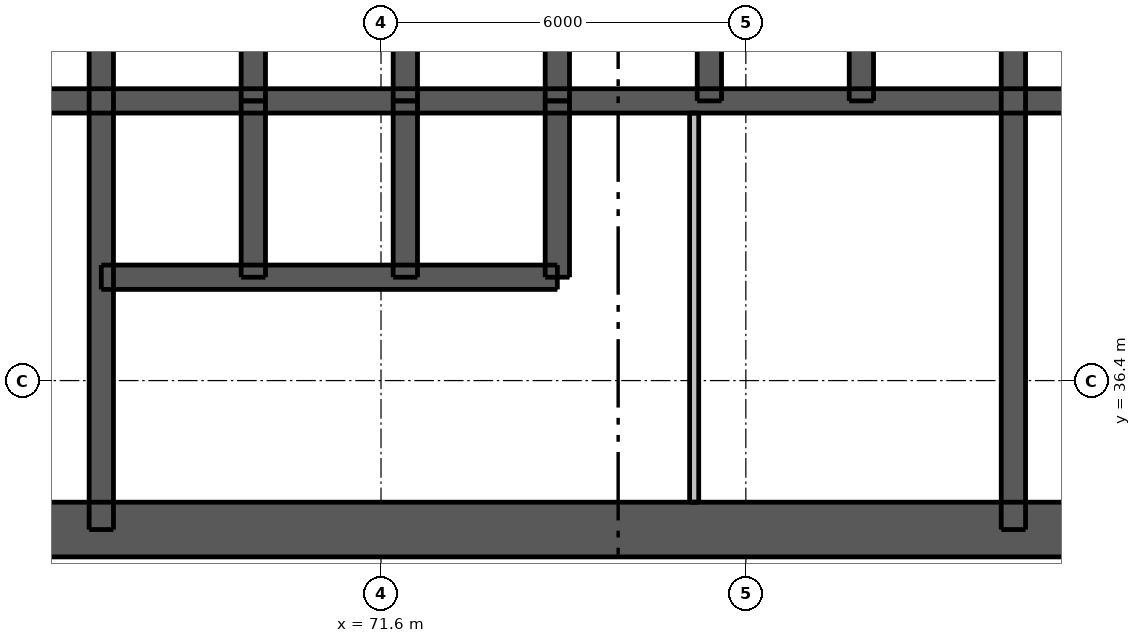
"""IFC4 building model, lengths in metres.
Left out: names, types, materials, properties, quantities, classifications, styles, units other than length and angle.
Written with IfcOpenShell. Run it as: python <this file> out.ifc"""

import sys

from ifc_helpers import new_model, si_unit, direction, frame, frame_2d, origin, place, context, subcontext, project, spatial, rectangle, extrude, element, fill, save


model = new_model("IFC4")
c1 = context("Model", 3, precision=1e-05, world=origin(), true_north=direction((0.0, 1.0)))
c2 = subcontext(c1, "Body", "Model", "MODEL_VIEW")
j1 = project(units=[si_unit("LENGTHUNIT", "METRE"), si_unit("PLANEANGLEUNIT", "RADIAN")], contexts=[c1])
p1 = place(None, origin())
s1 = spatial("IfcSite", under=j1, at=p1, CompositionType="ELEMENT")
p2 = place(p1, origin())
s2 = spatial("IfcBuilding", under=s1, at=p2, CompositionType="ELEMENT")
p3 = place(p2, frame((0.0, 0.0, 33.4)))
s3 = spatial("IfcBuildingStorey", under=s2, at=p3, CompositionType="ELEMENT", Elevation=33.4)
p4 = place(p3, frame((62.5, 33.95, 0.0), z_axis=(0.0, 0.0, 1.0), x_axis=(1.0, 0.0, 0.0)))
e1 = element("IfcWall", 1, at=p4, inside=s3, PredefinedType="SHEAR", context=c2, shape_type="SweptSolid", body=[
    extrude(rectangle(XDim=24.0, YDim=0.9, at=frame_2d((12.0, 0.0))), origin(), (0.0, 0.0, 1.0), 3.05),
])
p5 = place(p4, frame((2.05, 0.0, 0.0)))
e2 = element("IfcOpeningElement", 2, at=p5, cuts=e1, PredefinedType="OPENING", context=c2, shape_type="SweptSolid", body=[
    extrude(rectangle(XDim=1.1, YDim=2.1, at=frame_2d((0.55, 1.05))), frame((0.0, 0.46, 0.0), z_axis=(0.0, -1.0, 0.0), x_axis=(1.0, 0.0, 0.0)), (0.0, 0.0, 1.0), 0.92),
])
p6 = place(p4, frame((20.85, 0.0, 0.0)))
e3 = element("IfcOpeningElement", 3, at=p6, cuts=e1, PredefinedType="OPENING", context=c2, shape_type="SweptSolid", body=[
    extrude(rectangle(XDim=1.1, YDim=2.1, at=frame_2d((0.55, 1.05))), frame((0.0, 0.46, 0.0), z_axis=(0.0, -1.0, 0.0), x_axis=(1.0, 0.0, 0.0)), (0.0, 0.0, 1.0), 0.92),
])
p7 = place(p4, frame((8.0, 0.0, 0.0)))
e4 = element("IfcOpeningElement", 4, at=p7, cuts=e1, PredefinedType="OPENING", context=c2, shape_type="SweptSolid", body=[
    extrude(rectangle(XDim=1.1, YDim=2.1, at=frame_2d((0.55, 1.05))), frame((0.0, 0.46, 0.0), z_axis=(0.0, -1.0, 0.0), x_axis=(1.0, 0.0, 0.0)), (0.0, 0.0, 1.0), 0.92),
])
p8 = place(p4, frame((16.363, 0.0, 0.0)))
e5 = element("IfcOpeningElement", 5, at=p8, cuts=e1, PredefinedType="OPENING", context=c2, shape_type="SweptSolid", body=[
    extrude(rectangle(XDim=0.9, YDim=2.1, at=frame_2d((0.45, 1.05))), frame((0.0, 0.46, 0.0), z_axis=(0.0, -1.0, 0.0), x_axis=(1.0, 0.0, 0.0)), (0.0, 0.0, 1.0), 0.92),
])
p9 = place(p3, frame((62.95, 41.0, 0.0), z_axis=(0.0, 0.0, 1.0), x_axis=(1.0, 0.0, 0.0)))
e6 = element("IfcWall", 6, at=p9, inside=s3, PredefinedType="SHEAR", context=c2, shape_type="SweptSolid", body=[
    extrude(rectangle(XDim=23.1, YDim=0.4, at=frame_2d((11.55, 0.0))), origin(), (0.0, 0.0, 1.0), 3.05),
])
p10 = place(p3, frame((67.0, 33.95, 0.0), z_axis=(0.0, 0.0, 1.0), x_axis=(0.0, 1.0, 0.0)))
e7 = element("IfcWall", 7, at=p10, inside=s3, PredefinedType="SHEAR", context=c2, shape_type="SweptSolid", body=[
    extrude(rectangle(XDim=9.95, YDim=0.4, at=frame_2d((4.975, 0.0))), origin(), (0.0, 0.0, 1.0), 3.05),
])
p11 = place(p10, frame((0.65, 0.0, 0.0)))
e8 = element("IfcOpeningElement", 8, at=p11, cuts=e7, PredefinedType="OPENING", context=c2, shape_type="SweptSolid", body=[
    extrude(rectangle(XDim=1.1, YDim=2.1, at=frame_2d((0.55, 1.05))), frame((0.0, 0.21, 0.0), z_axis=(0.0, -1.0, 0.0), x_axis=(1.0, 0.0, 0.0)), (0.0, 0.0, 1.0), 0.42),
])
p12 = place(p3, frame((82.0, 33.95, 0.0), z_axis=(0.0, 0.0, 1.0), x_axis=(0.0, 1.0, 0.0)))
e9 = element("IfcWall", 9, at=p12, inside=s3, PredefinedType="SHEAR", context=c2, shape_type="SweptSolid", body=[
    extrude(rectangle(XDim=9.95, YDim=0.4, at=frame_2d((4.975, 0.0))), origin(), (0.0, 0.0, 1.0), 3.05),
])
for number, where, z_axis, x_axis in (
    (10, (69.5, 41.0, 0.0), (0.0, 0.0, 1.0), (0.0, 1.0, 0.0)),
    (11, (72.0, 41.0, 0.0), (0.0, 0.0, 1.0), (0.0, 1.0, 0.0)),
    (12, (74.5, 41.0, 0.0), (0.0, 0.0, 1.0), (0.0, 1.0, 0.0)),
    (13, (77.0, 41.0, 0.0), (0.0, 0.0, 1.0), (0.0, 1.0, 0.0)),
    (14, (79.5, 41.0, 0.0), (0.0, 0.0, 1.0), (0.0, 1.0, 0.0)),
):
    element("IfcWall", number, at=place(p3, frame(where, z_axis=z_axis, x_axis=x_axis)), inside=s3, PredefinedType="SHEAR", context=c2, shape_type="SweptSolid", body=[
        extrude(rectangle(XDim=2.9, YDim=0.4, at=frame_2d((1.45, 0.0))), origin(), (0.0, 0.0, 1.0), 3.05),
    ])
p13 = place(p3, frame((67.0, 38.1, 0.0), z_axis=(0.0, 0.0, 1.0), x_axis=(1.0, 0.0, 0.0)))
e15 = element("IfcWall", 15, at=p13, inside=s3, PredefinedType="SHEAR", context=c2, shape_type="SweptSolid", body=[
    extrude(rectangle(XDim=7.5, YDim=0.4, at=frame_2d((3.75, 0.0))), origin(), (0.0, 0.0, 1.0), 3.05),
])
p14 = place(p13, frame((0.7, 0.0, 0.0)))
e16 = element("IfcOpeningElement", 16, at=p14, cuts=e15, PredefinedType="OPENING", context=c2, shape_type="SweptSolid", body=[
    extrude(rectangle(XDim=1.1, YDim=2.1, at=frame_2d((0.55, 1.05))), frame((0.0, 0.21, 0.0), z_axis=(0.0, -1.0, 0.0), x_axis=(1.0, 0.0, 0.0)), (0.0, 0.0, 1.0), 0.42),
])
p15 = place(p13, frame((3.2, 0.0, 0.0)))
e17 = element("IfcOpeningElement", 17, at=p15, cuts=e15, PredefinedType="OPENING", context=c2, shape_type="SweptSolid", body=[
    extrude(rectangle(XDim=1.1, YDim=2.1, at=frame_2d((0.55, 1.05))), frame((0.0, 0.21, 0.0), z_axis=(0.0, -1.0, 0.0), x_axis=(1.0, 0.0, 0.0)), (0.0, 0.0, 1.0), 0.42),
])
p16 = place(p13, frame((5.65, 0.0, 0.0)))
e18 = element("IfcOpeningElement", 18, at=p16, cuts=e15, PredefinedType="OPENING", context=c2, shape_type="SweptSolid", body=[
    extrude(rectangle(XDim=1.2, YDim=2.1, at=frame_2d((0.6, 1.05))), frame((0.0, 0.21, 0.0), z_axis=(0.0, -1.0, 0.0), x_axis=(1.0, 0.0, 0.0)), (0.0, 0.0, 1.0), 0.42),
])
for number, where, z_axis, x_axis in (
    (19, (69.5, 38.1, 0.0), (0.0, 0.0, 1.0), (0.0, 1.0, 0.0)),
    (20, (72.0, 38.1, 0.0), (0.0, 0.0, 1.0), (0.0, 1.0, 0.0)),
    (21, (74.5, 38.1, 0.0), (0.0, 0.0, 1.0), (0.0, 1.0, 0.0)),
):
    element("IfcWall", number, at=place(p3, frame(where, z_axis=z_axis, x_axis=x_axis)), inside=s3, PredefinedType="SHEAR", context=c2, shape_type="SweptSolid", body=[
        extrude(rectangle(XDim=2.9, YDim=0.4, at=frame_2d((1.45, 0.0))), origin(), (0.0, 0.0, 1.0), 3.05),
    ])
p17 = place(p3, frame((76.75, 34.4, 0.0), z_axis=(0.0, 0.0, 1.0), x_axis=(0.0, 1.0, 0.0)))
e22 = element("IfcWall", 22, at=p17, inside=s3, PredefinedType="PLUMBINGWALL", context=c2, shape_type="SweptSolid", body=[
    extrude(rectangle(XDim=6.4, YDim=0.15, at=frame_2d((3.2, 0.0))), origin(), (0.0, 0.0, 1.0), 3.05),
])
p18 = place(p7, origin())
e23 = element("IfcDoor", 23, at=p18, inside=s3, OperationType="SINGLE_SWING_LEFT", PredefinedType="DOOR", context=c2, shape_type="SweptSolid", body=[
    extrude(rectangle(XDim=1.1, YDim=2.1, at=frame_2d((0.55, 1.05))), frame((0.0, 0.438, 0.0), z_axis=(0.0, -1.0, 0.0), x_axis=(1.0, 0.0, 0.0)), (0.0, 0.0, 1.0), 0.05),
])
fill(e4, e23)
p19 = place(p11, origin())
e24 = element("IfcDoor", 24, at=p19, inside=s3, OperationType="SINGLE_SWING_RIGHT", PredefinedType="DOOR", context=c2, shape_type="SweptSolid", body=[
    extrude(rectangle(XDim=1.1, YDim=2.1, at=frame_2d((0.55, 1.05))), frame((0.0, -0.138, 0.0), z_axis=(0.0, -1.0, 0.0), x_axis=(1.0, 0.0, 0.0)), (0.0, 0.0, 1.0), 0.05),
])
fill(e8, e24)
p20 = place(p8, origin())
e25 = element("IfcDoor", 25, at=p20, inside=s3, OperationType="SINGLE_SWING_LEFT", PredefinedType="DOOR", context=c2, shape_type="SweptSolid", body=[
    extrude(rectangle(XDim=0.9, YDim=2.1, at=frame_2d((0.45, 1.05))), frame((0.0, 0.438, 0.0), z_axis=(0.0, -1.0, 0.0), x_axis=(1.0, 0.0, 0.0)), (0.0, 0.0, 1.0), 0.05),
])
fill(e5, e25)
p21 = place(p14, origin())
e26 = element("IfcDoor", 26, at=p21, inside=s3, OperationType="DOUBLE_DOOR_SLIDING", PredefinedType="DOOR", context=c2, shape_type="SweptSolid", body=[
    extrude(rectangle(XDim=1.1, YDim=2.1, at=frame_2d((0.55, 1.05))), frame((0.0, 0.025, 0.0), z_axis=(0.0, -1.0, 0.0), x_axis=(1.0, 0.0, 0.0)), (0.0, 0.0, 1.0), 0.05),
])
fill(e16, e26)
p22 = place(p15, origin())
e27 = element("IfcDoor", 27, at=p22, inside=s3, OperationType="DOUBLE_DOOR_SLIDING", PredefinedType="DOOR", context=c2, shape_type="SweptSolid", body=[
    extrude(rectangle(XDim=1.1, YDim=2.1, at=frame_2d((0.55, 1.05))), frame((0.0, 0.025, 0.0), z_axis=(0.0, -1.0, 0.0), x_axis=(1.0, 0.0, 0.0)), (0.0, 0.0, 1.0), 0.05),
])
fill(e17, e27)
p23 = place(p16, origin())
e28 = element("IfcDoor", 28, at=p23, inside=s3, OperationType="DOUBLE_DOOR_SLIDING", PredefinedType="DOOR", context=c2, shape_type="SweptSolid", body=[
    extrude(rectangle(XDim=1.2, YDim=2.1, at=frame_2d((0.6, 1.05))), frame((0.0, 0.025, 0.0), z_axis=(0.0, -1.0, 0.0), x_axis=(1.0, 0.0, 0.0)), (0.0, 0.0, 1.0), 0.05),
])
fill(e18, e28)
save(model, sys.argv[1])
